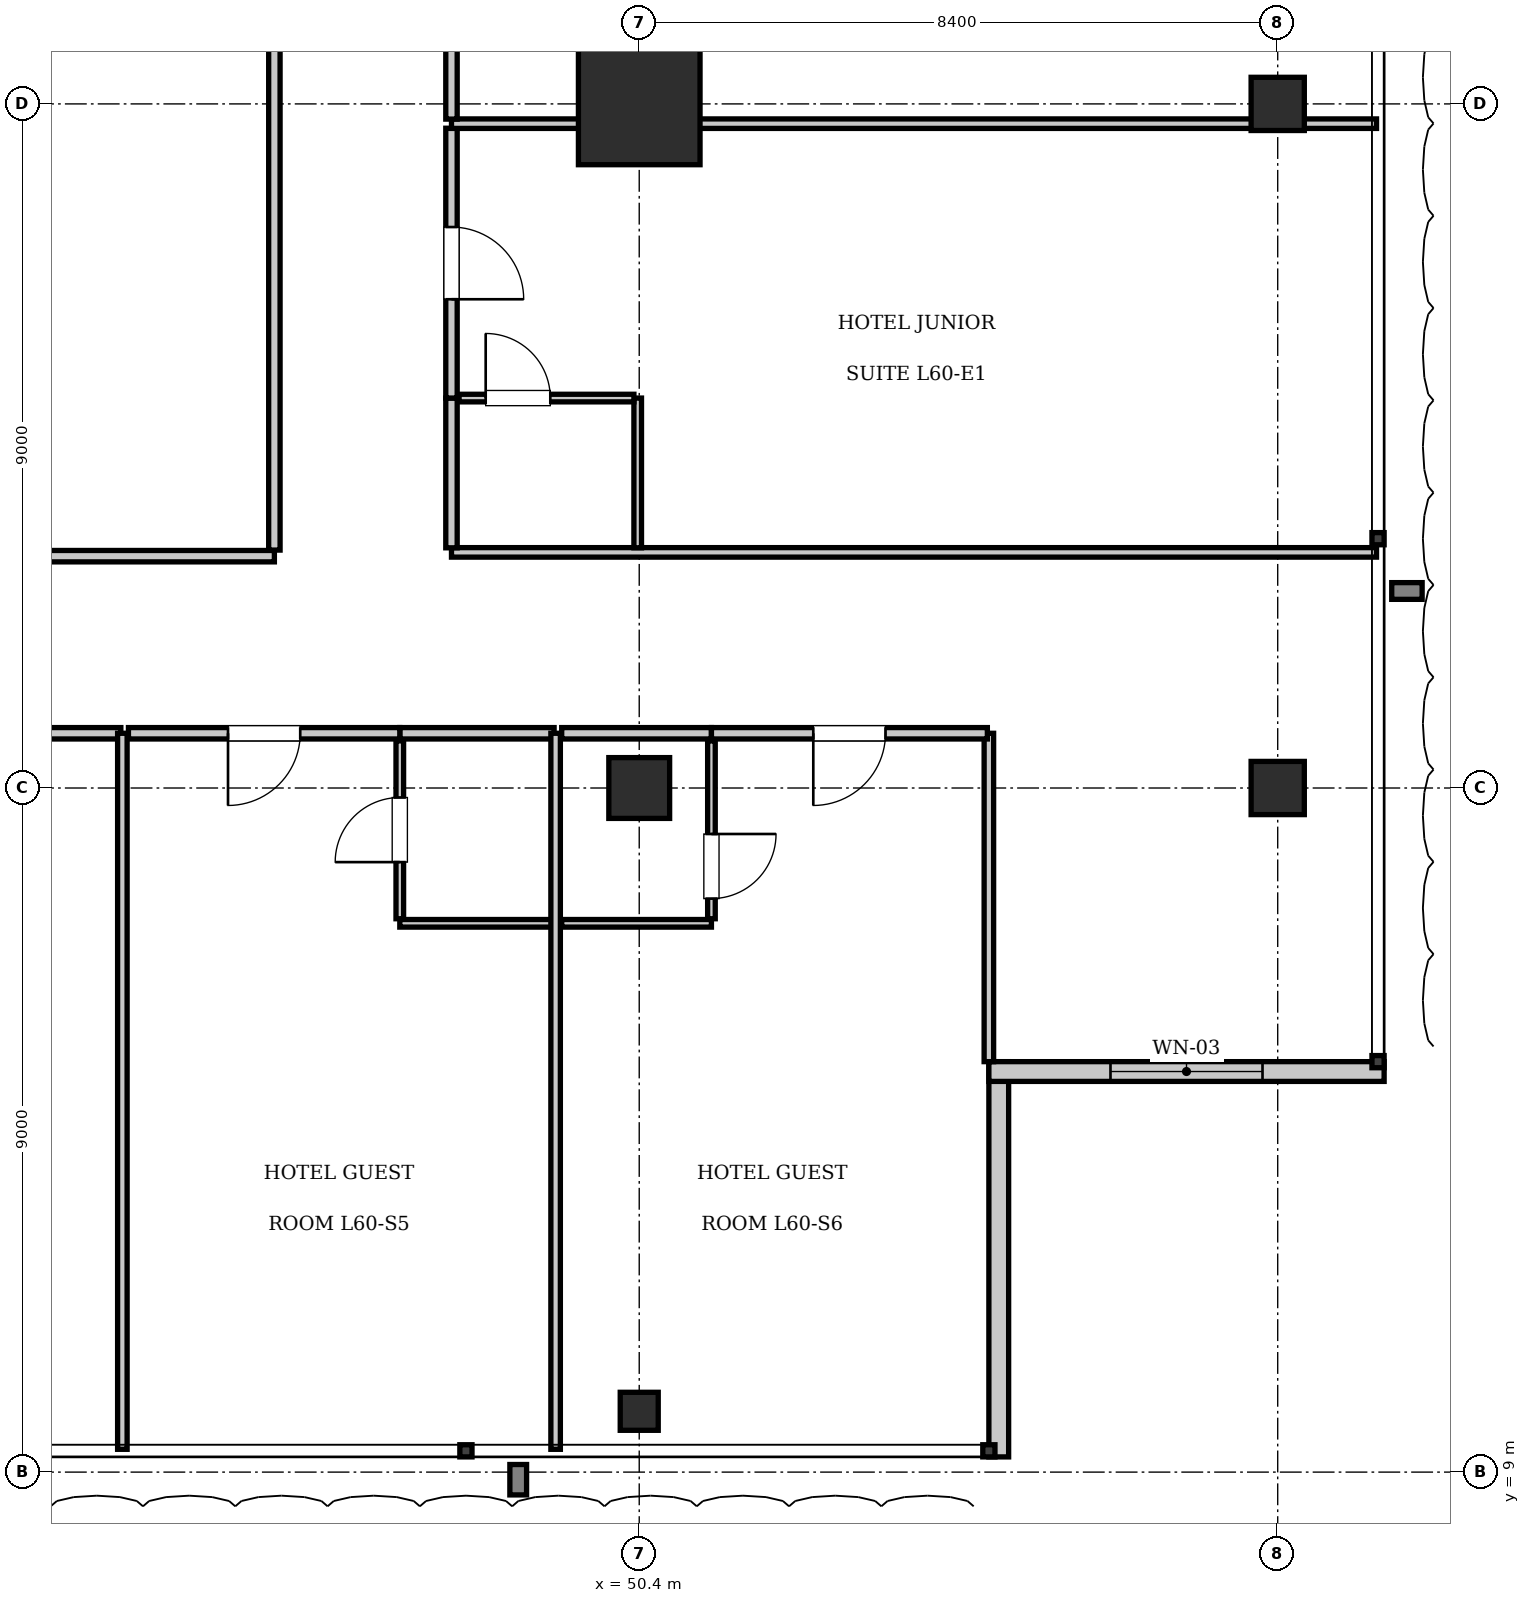
"""IFC4 building model, lengths in metres.
Left out: names, types, materials, properties, quantities, classifications, styles, units other than length and angle.
Written with IfcOpenShell. Run it as: python <this file> out.ifc"""

import sys

from ifc_helpers import new_model, si_unit, direction, frame, frame_2d, origin, origin_2d, place, context, subcontext, project, spatial, rectangle, i_section, extrude, element, fill, save


model = new_model("IFC4")
c1 = context("Model", 3, precision=1e-05, world=origin(), true_north=direction((0.0, 1.0)))
c2 = subcontext(c1, "Body", "Model", "MODEL_VIEW")
j1 = project(units=[si_unit("LENGTHUNIT", "METRE"), si_unit("PLANEANGLEUNIT", "RADIAN")], contexts=[c1])
p1 = place(None, origin())
s1 = spatial("IfcSite", under=j1, at=p1, CompositionType="ELEMENT")
p2 = place(p1, origin())
s2 = spatial("IfcBuilding", under=s1, at=p2, CompositionType="ELEMENT")
p3 = place(p2, frame((0.0, 0.0, 247.1)))
s3 = spatial("IfcBuildingStorey", under=s2, at=p3, CompositionType="ELEMENT", Elevation=247.1)
p4 = place(p3, frame((50.4, 27.0, 0.0), z_axis=(0.0, 0.0, 1.0), x_axis=(1.0, 0.0, 0.0)))
e1 = element("IfcColumn", 1, at=p4, inside=s3, PredefinedType="COLUMN", context=c2, shape_type="SweptSolid", body=[
    extrude(rectangle(XDim=1.6, YDim=1.6, at=origin_2d()), origin(), (0.0, 0.0, 1.0), 3.85),
])
p5 = place(p3, frame((50.4, 18.0, 0.0), z_axis=(0.0, 0.0, 1.0), x_axis=(1.0, 0.0, 0.0)))
e2 = element("IfcColumn", 2, at=p5, inside=s3, PredefinedType="COLUMN", context=c2, shape_type="SweptSolid", body=[
    extrude(rectangle(XDim=0.8, YDim=0.8, at=origin_2d()), origin(), (0.0, 0.0, 1.0), 3.85),
])
for number, where, z_axis, x_axis in (
    (3, (58.8, 18.0, 0.0), (0.0, 0.0, 1.0), (1.0, 0.0, 0.0)),
    (4, (58.8, 27.0, 0.0), (0.0, 0.0, 1.0), (1.0, 0.0, 0.0)),
):
    element("IfcColumn", number, at=place(p3, frame(where, z_axis=z_axis, x_axis=x_axis)), inside=s3, PredefinedType="COLUMN", context=c2, shape_type="SweptSolid", body=[
        extrude(rectangle(XDim=0.7, YDim=0.7, at=origin_2d()), origin(), (0.0, 0.0, 1.0), 3.85),
    ])
p6 = place(p3, frame((50.4, 9.8, 0.0), z_axis=(0.0, 0.0, 1.0), x_axis=(1.0, 0.0, 0.0)))
e5 = element("IfcColumn", 5, at=p6, inside=s3, PredefinedType="COLUMN", context=c2, shape_type="SweptSolid", body=[
    extrude(i_section(OverallWidth=0.5, OverallDepth=0.5, WebThickness=0.022, FlangeThickness=0.032, at=origin_2d()), origin(), (0.0, 0.0, 1.0), 3.85),
])
p7 = place(p3, frame((55.13, 14.4, 0.0), z_axis=(0.0, 0.0, 1.0), x_axis=(0.0, -1.0, 0.0)))
e6 = element("IfcWall", 6, at=p7, inside=s3, PredefinedType="SOLIDWALL", context=c2, shape_type="SweptSolid", body=[
    extrude(rectangle(XDim=5.2, YDim=0.26, at=frame_2d((2.6, 0.0))), origin(), (0.0, 0.0, 1.0), 3.61),
])
p8 = place(p3, frame((60.2, 14.27, 0.0), z_axis=(0.0, 0.0, 1.0), x_axis=(-1.0, 0.0, 0.0)))
e7 = element("IfcWall", 7, at=p8, inside=s3, PredefinedType="SOLIDWALL", context=c2, shape_type="SweptSolid", body=[
    extrude(rectangle(XDim=5.2, YDim=0.26, at=frame_2d((2.6, 0.0))), origin(), (0.0, 0.0, 1.0), 3.61),
])
p9 = place(p8, frame((1.6, 0.0, 0.9)))
e8 = element("IfcOpeningElement", 8, at=p9, cuts=e7, PredefinedType="OPENING", context=c2, shape_type="SweptSolid", body=[
    extrude(rectangle(XDim=2.0, YDim=2.2, at=frame_2d((1.0, 1.1))), frame((0.0, 0.14, 0.0), z_axis=(0.0, -1.0, 0.0), x_axis=(1.0, 0.0, 0.0)), (0.0, 0.0, 1.0), 0.28),
])
p10 = place(p3, frame((30.05, 21.05, 0.0), z_axis=(0.0, 0.0, 1.0), x_axis=(1.0, 0.0, 0.0)))
e9 = element("IfcWall", 9, at=p10, inside=s3, PredefinedType="PARTITIONING", context=c2, shape_type="SweptSolid", body=[
    extrude(rectangle(XDim=15.55, YDim=0.15, at=frame_2d((7.775, 0.0))), origin(), (0.0, 0.0, 1.0), 3.61),
])
p11 = place(p3, frame((45.6, 21.13, 0.0), z_axis=(0.0, 0.0, 1.0), x_axis=(0.0, 1.0, 0.0)))
e10 = element("IfcWall", 10, at=p11, inside=s3, PredefinedType="PARTITIONING", context=c2, shape_type="SweptSolid", body=[
    extrude(rectangle(XDim=9.49, YDim=0.15, at=frame_2d((4.745, 0.0))), origin(), (0.0, 0.0, 1.0), 3.61),
])
p12 = place(p3, frame((55.0, 14.4, 0.0), z_axis=(0.0, 0.0, 1.0), x_axis=(0.0, 1.0, 0.0)))
e11 = element("IfcWall", 11, at=p12, inside=s3, PredefinedType="PARTITIONING", context=c2, shape_type="SweptSolid", body=[
    extrude(rectangle(XDim=4.32, YDim=0.125, at=frame_2d((2.16, 0.0))), origin(), (0.0, 0.0, 1.0), 3.61),
])
p13 = place(p3, frame((39.89, 18.72, 0.0), z_axis=(0.0, 0.0, 1.0), x_axis=(1.0, 0.0, 0.0)))
e12 = element("IfcWall", 12, at=p13, inside=s3, PredefinedType="PARTITIONING", context=c2, shape_type="SweptSolid", body=[
    extrude(rectangle(XDim=3.69, YDim=0.15, at=frame_2d((1.845, 0.0))), origin(), (0.0, 0.0, 1.0), 3.61),
])
p14 = place(p13, frame((0.41, 0.0, 0.0)))
e13 = element("IfcOpeningElement", 13, at=p14, cuts=e12, PredefinedType="OPENING", context=c2, shape_type="SweptSolid", body=[
    extrude(rectangle(XDim=0.95, YDim=2.15, at=frame_2d((0.475, 1.075))), frame((0.0, 0.085, 0.0), z_axis=(0.0, -1.0, 0.0), x_axis=(1.0, 0.0, 0.0)), (0.0, 0.0, 1.0), 0.17),
])
p15 = place(p3, frame((43.6, 9.3, 0.0), z_axis=(0.0, 0.0, 1.0), x_axis=(0.0, 1.0, 0.0)))
e14 = element("IfcWall", 14, at=p15, inside=s3, PredefinedType="PARTITIONING", context=c2, shape_type="SweptSolid", body=[
    extrude(rectangle(XDim=9.42, YDim=0.125, at=frame_2d((4.71, 0.0))), origin(), (0.0, 0.0, 1.0), 3.61),
])
p16 = place(p3, frame((47.25, 18.72, 0.0), z_axis=(0.0, 0.0, 1.0), x_axis=(1.0, 0.0, 0.0)))
e15 = element("IfcWall", 15, at=p16, inside=s3, PredefinedType="PARTITIONING", context=c2, shape_type="SweptSolid", body=[
    extrude(rectangle(XDim=2.03, YDim=0.15, at=frame_2d((1.015, 0.0))), origin(), (0.0, 0.0, 1.0), 3.61),
])
p17 = place(p3, frame((47.25, 16.22, 0.0), z_axis=(0.0, 0.0, 1.0), x_axis=(1.0, 0.0, 0.0)))
e16 = element("IfcWall", 16, at=p17, inside=s3, PredefinedType="PARTITIONING", context=c2, shape_type="SweptSolid", body=[
    extrude(rectangle(XDim=2.01, YDim=0.1, at=frame_2d((1.005, 0.0))), origin(), (0.0, 0.0, 1.0), 3.61),
])
p18 = place(p3, frame((47.25, 16.28, 0.0), z_axis=(0.0, 0.0, 1.0), x_axis=(0.0, 1.0, 0.0)))
e17 = element("IfcWall", 17, at=p18, inside=s3, PredefinedType="PARTITIONING", context=c2, shape_type="SweptSolid", body=[
    extrude(rectangle(XDim=2.34, YDim=0.1, at=frame_2d((1.17, 0.0))), origin(), (0.0, 0.0, 1.0), 3.61),
])
p19 = place(p18, frame((0.745, 0.0, 0.0)))
e18 = element("IfcOpeningElement", 18, at=p19, cuts=e17, PredefinedType="OPENING", context=c2, shape_type="SweptSolid", body=[
    extrude(rectangle(XDim=0.85, YDim=2.1, at=frame_2d((0.425, 1.05))), frame((0.0, 0.06, 0.0), z_axis=(0.0, -1.0, 0.0), x_axis=(1.0, 0.0, 0.0)), (0.0, 0.0, 1.0), 0.12),
])
p20 = place(p3, frame((43.68, 18.72, 0.0), z_axis=(0.0, 0.0, 1.0), x_axis=(1.0, 0.0, 0.0)))
e19 = element("IfcWall", 19, at=p20, inside=s3, PredefinedType="PARTITIONING", context=c2, shape_type="SweptSolid", body=[
    extrude(rectangle(XDim=3.57, YDim=0.15, at=frame_2d((1.785, 0.0))), origin(), (0.0, 0.0, 1.0), 3.61),
])
p21 = place(p20, frame((1.31, 0.0, 0.0)))
e20 = element("IfcOpeningElement", 20, at=p21, cuts=e19, PredefinedType="OPENING", context=c2, shape_type="SweptSolid", body=[
    extrude(rectangle(XDim=0.95, YDim=2.15, at=frame_2d((0.475, 1.075))), frame((0.0, 0.085, 0.0), z_axis=(0.0, -1.0, 0.0), x_axis=(1.0, 0.0, 0.0)), (0.0, 0.0, 1.0), 0.17),
])
p22 = place(p3, frame((49.3, 9.3, 0.0), z_axis=(0.0, 0.0, 1.0), x_axis=(0.0, 1.0, 0.0)))
e21 = element("IfcWall", 21, at=p22, inside=s3, PredefinedType="PARTITIONING", context=c2, shape_type="SweptSolid", body=[
    extrude(rectangle(XDim=9.42, YDim=0.125, at=frame_2d((4.71, 0.0))), origin(), (0.0, 0.0, 1.0), 3.61),
])
p23 = place(p3, frame((49.38, 18.72, 0.0), z_axis=(0.0, 0.0, 1.0), x_axis=(1.0, 0.0, 0.0)))
e22 = element("IfcWall", 22, at=p23, inside=s3, PredefinedType="PARTITIONING", context=c2, shape_type="SweptSolid", body=[
    extrude(rectangle(XDim=1.97, YDim=0.15, at=frame_2d((0.985, 0.0))), origin(), (0.0, 0.0, 1.0), 3.61),
])
p24 = place(p3, frame((49.38, 16.22, 0.0), z_axis=(0.0, 0.0, 1.0), x_axis=(1.0, 0.0, 0.0)))
e23 = element("IfcWall", 23, at=p24, inside=s3, PredefinedType="PARTITIONING", context=c2, shape_type="SweptSolid", body=[
    extrude(rectangle(XDim=1.97, YDim=0.1, at=frame_2d((0.985, 0.0))), origin(), (0.0, 0.0, 1.0), 3.61),
])
p25 = place(p3, frame((51.35, 16.28, 0.0), z_axis=(0.0, 0.0, 1.0), x_axis=(0.0, 1.0, 0.0)))
e24 = element("IfcWall", 24, at=p25, inside=s3, PredefinedType="PARTITIONING", context=c2, shape_type="SweptSolid", body=[
    extrude(rectangle(XDim=2.34, YDim=0.1, at=frame_2d((1.17, 0.0))), origin(), (0.0, 0.0, 1.0), 3.61),
])
p26 = place(p25, frame((0.265, 0.0, 0.0)))
e25 = element("IfcOpeningElement", 25, at=p26, cuts=e24, PredefinedType="OPENING", context=c2, shape_type="SweptSolid", body=[
    extrude(rectangle(XDim=0.85, YDim=2.1, at=frame_2d((0.425, 1.05))), frame((0.0, 0.06, 0.0), z_axis=(0.0, -1.0, 0.0), x_axis=(1.0, 0.0, 0.0)), (0.0, 0.0, 1.0), 0.12),
])
p27 = place(p3, frame((51.35, 18.72, 0.0), z_axis=(0.0, 0.0, 1.0), x_axis=(1.0, 0.0, 0.0)))
e26 = element("IfcWall", 26, at=p27, inside=s3, PredefinedType="PARTITIONING", context=c2, shape_type="SweptSolid", body=[
    extrude(rectangle(XDim=3.63, YDim=0.15, at=frame_2d((1.815, 0.0))), origin(), (0.0, 0.0, 1.0), 3.61),
])
p28 = place(p27, frame((1.34, 0.0, 0.0)))
e27 = element("IfcOpeningElement", 27, at=p28, cuts=e26, PredefinedType="OPENING", context=c2, shape_type="SweptSolid", body=[
    extrude(rectangle(XDim=0.95, YDim=2.15, at=frame_2d((0.475, 1.075))), frame((0.0, 0.085, 0.0), z_axis=(0.0, -1.0, 0.0), x_axis=(1.0, 0.0, 0.0)), (0.0, 0.0, 1.0), 0.17),
])
p29 = place(p3, frame((47.93, 21.1, 0.0), z_axis=(0.0, 0.0, 1.0), x_axis=(1.0, 0.0, 0.0)))
e28 = element("IfcWall", 28, at=p29, inside=s3, PredefinedType="PARTITIONING", context=c2, shape_type="SweptSolid", body=[
    extrude(rectangle(XDim=12.17, YDim=0.125, at=frame_2d((6.085, 0.0))), origin(), (0.0, 0.0, 1.0), 3.61),
])
p30 = place(p3, frame((47.93, 21.16, 0.0), z_axis=(0.0, 0.0, 1.0), x_axis=(0.0, 1.0, 0.0)))
e29 = element("IfcWall", 29, at=p30, inside=s3, PredefinedType="PARTITIONING", context=c2, shape_type="SweptSolid", body=[
    extrude(rectangle(XDim=1.97, YDim=0.15, at=frame_2d((0.985, 0.0))), origin(), (0.0, 0.0, 1.0), 3.61),
])
p31 = place(p3, frame((47.93, 23.13, 0.0), z_axis=(0.0, 0.0, 1.0), x_axis=(0.0, 1.0, 0.0)))
e30 = element("IfcWall", 30, at=p31, inside=s3, PredefinedType="PARTITIONING", context=c2, shape_type="SweptSolid", body=[
    extrude(rectangle(XDim=3.55, YDim=0.15, at=frame_2d((1.775, 0.0))), origin(), (0.0, 0.0, 1.0), 3.61),
])
p32 = place(p31, frame((1.3, 0.0, 0.0)))
e31 = element("IfcOpeningElement", 31, at=p32, cuts=e30, PredefinedType="OPENING", context=c2, shape_type="SweptSolid", body=[
    extrude(rectangle(XDim=0.95, YDim=2.15, at=frame_2d((0.475, 1.075))), frame((0.0, 0.085, 0.0), z_axis=(0.0, -1.0, 0.0), x_axis=(1.0, 0.0, 0.0)), (0.0, 0.0, 1.0), 0.17),
])
p33 = place(p3, frame((50.38, 21.16, 0.0), z_axis=(0.0, 0.0, 1.0), x_axis=(0.0, 1.0, 0.0)))
e32 = element("IfcWall", 32, at=p33, inside=s3, PredefinedType="PARTITIONING", context=c2, shape_type="SweptSolid", body=[
    extrude(rectangle(XDim=1.97, YDim=0.1, at=frame_2d((0.985, 0.0))), origin(), (0.0, 0.0, 1.0), 3.077),
])
p34 = place(p3, frame((48.03, 23.13, 0.0), z_axis=(0.0, 0.0, 1.0), x_axis=(1.0, 0.0, 0.0)))
e33 = element("IfcWall", 33, at=p34, inside=s3, PredefinedType="PARTITIONING", context=c2, shape_type="SweptSolid", body=[
    extrude(rectangle(XDim=2.3, YDim=0.1, at=frame_2d((1.15, 0.0))), origin(), (0.0, 0.0, 1.0), 3.61),
])
p35 = place(p34, frame((0.35, 0.0, 0.0)))
e34 = element("IfcOpeningElement", 34, at=p35, cuts=e33, PredefinedType="OPENING", context=c2, shape_type="SweptSolid", body=[
    extrude(rectangle(XDim=0.85, YDim=2.1, at=frame_2d((0.425, 1.05))), frame((0.0, 0.06, 0.0), z_axis=(0.0, -1.0, 0.0), x_axis=(1.0, 0.0, 0.0)), (0.0, 0.0, 1.0), 0.12),
])
p36 = place(p3, frame((47.93, 26.74, 0.0), z_axis=(0.0, 0.0, 1.0), x_axis=(1.0, 0.0, 0.0)))
e35 = element("IfcWall", 35, at=p36, inside=s3, PredefinedType="PARTITIONING", context=c2, shape_type="SweptSolid", body=[
    extrude(rectangle(XDim=12.17, YDim=0.125, at=frame_2d((6.085, 0.0))), origin(), (0.0, 0.0, 1.0), 2.41),
])
p37 = place(p3, frame((47.93, 26.8, 0.0), z_axis=(0.0, 0.0, 1.0), x_axis=(0.0, 1.0, 0.0)))
e36 = element("IfcWall", 36, at=p37, inside=s3, PredefinedType="PARTITIONING", context=c2, shape_type="SweptSolid", body=[
    extrude(rectangle(XDim=3.55, YDim=0.15, at=frame_2d((1.775, 0.0))), origin(), (0.0, 0.0, 1.0), 3.61),
])
p38 = place(p37, frame((1.3, 0.0, 0.0)))
e37 = element("IfcOpeningElement", 37, at=p38, cuts=e36, PredefinedType="OPENING", context=c2, shape_type="SweptSolid", body=[
    extrude(rectangle(XDim=0.95, YDim=2.15, at=frame_2d((0.475, 1.075))), frame((0.0, 0.085, 0.0), z_axis=(0.0, -1.0, 0.0), x_axis=(1.0, 0.0, 0.0)), (0.0, 0.0, 1.0), 0.17),
])
p39 = place(p9, origin())
e38 = element("IfcWindow", 38, at=p39, inside=s3, PartitioningType="SINGLE_PANEL", PredefinedType="WINDOW", context=c2, shape_type="SweptSolid", body=[
    extrude(rectangle(XDim=2.0, YDim=2.2, at=frame_2d((1.0, 1.1))), frame((0.0, 0.03, 0.0), z_axis=(0.0, -1.0, 0.0), x_axis=(1.0, 0.0, 0.0)), (0.0, 0.0, 1.0), 0.06),
])
fill(e8, e38)
p40 = place(p19, origin())
e39 = element("IfcDoor", 39, at=p40, inside=s3, OperationType="SINGLE_SWING_LEFT", PredefinedType="DOOR", context=c2, shape_type="SweptSolid", body=[
    extrude(rectangle(XDim=0.85, YDim=2.1, at=frame_2d((0.425, 1.05))), frame((0.0, 0.025, 0.0), z_axis=(0.0, -1.0, 0.0), x_axis=(1.0, 0.0, 0.0)), (0.0, 0.0, 1.0), 0.05),
])
fill(e18, e39)
p41 = place(p21, frame((0.95, 0.0, 0.0), z_axis=(0.0, 0.0, 1.0), x_axis=(-1.0, 0.0, 0.0)))
e40 = element("IfcDoor", 40, at=p41, inside=s3, OperationType="SINGLE_SWING_RIGHT", PredefinedType="DOOR", context=c2, shape_type="SweptSolid", body=[
    extrude(rectangle(XDim=0.95, YDim=2.15, at=frame_2d((0.475, 1.075))), frame((0.0, 0.025, 0.0), z_axis=(0.0, -1.0, 0.0), x_axis=(1.0, 0.0, 0.0)), (0.0, 0.0, 1.0), 0.05),
])
fill(e20, e40)
p42 = place(p26, frame((0.85, 0.0, 0.0), z_axis=(0.0, 0.0, 1.0), x_axis=(-1.0, 0.0, 0.0)))
e41 = element("IfcDoor", 41, at=p42, inside=s3, OperationType="SINGLE_SWING_LEFT", PredefinedType="DOOR", context=c2, shape_type="SweptSolid", body=[
    extrude(rectangle(XDim=0.85, YDim=2.1, at=frame_2d((0.425, 1.05))), frame((0.0, 0.025, 0.0), z_axis=(0.0, -1.0, 0.0), x_axis=(1.0, 0.0, 0.0)), (0.0, 0.0, 1.0), 0.05),
])
fill(e25, e41)
p43 = place(p28, frame((0.95, 0.0, 0.0), z_axis=(0.0, 0.0, 1.0), x_axis=(-1.0, 0.0, 0.0)))
e42 = element("IfcDoor", 42, at=p43, inside=s3, OperationType="SINGLE_SWING_RIGHT", PredefinedType="DOOR", context=c2, shape_type="SweptSolid", body=[
    extrude(rectangle(XDim=0.95, YDim=2.15, at=frame_2d((0.475, 1.075))), frame((0.0, 0.025, 0.0), z_axis=(0.0, -1.0, 0.0), x_axis=(1.0, 0.0, 0.0)), (0.0, 0.0, 1.0), 0.05),
])
fill(e27, e42)
p44 = place(p35, origin())
e43 = element("IfcDoor", 43, at=p44, inside=s3, OperationType="SINGLE_SWING_LEFT", PredefinedType="DOOR", context=c2, shape_type="SweptSolid", body=[
    extrude(rectangle(XDim=0.85, YDim=2.1, at=frame_2d((0.425, 1.05))), frame((0.0, 0.025, 0.0), z_axis=(0.0, -1.0, 0.0), x_axis=(1.0, 0.0, 0.0)), (0.0, 0.0, 1.0), 0.05),
])
fill(e34, e43)
p45 = place(p32, frame((0.95, 0.0, 0.0), z_axis=(0.0, 0.0, 1.0), x_axis=(-1.0, 0.0, 0.0)))
e44 = element("IfcDoor", 44, at=p45, inside=s3, OperationType="SINGLE_SWING_RIGHT", PredefinedType="DOOR", context=c2, shape_type="SweptSolid", body=[
    extrude(rectangle(XDim=0.95, YDim=2.15, at=frame_2d((0.475, 1.075))), frame((0.0, 0.025, 0.0), z_axis=(0.0, -1.0, 0.0), x_axis=(1.0, 0.0, 0.0)), (0.0, 0.0, 1.0), 0.05),
])
fill(e31, e44)
save(model, sys.argv[1])
